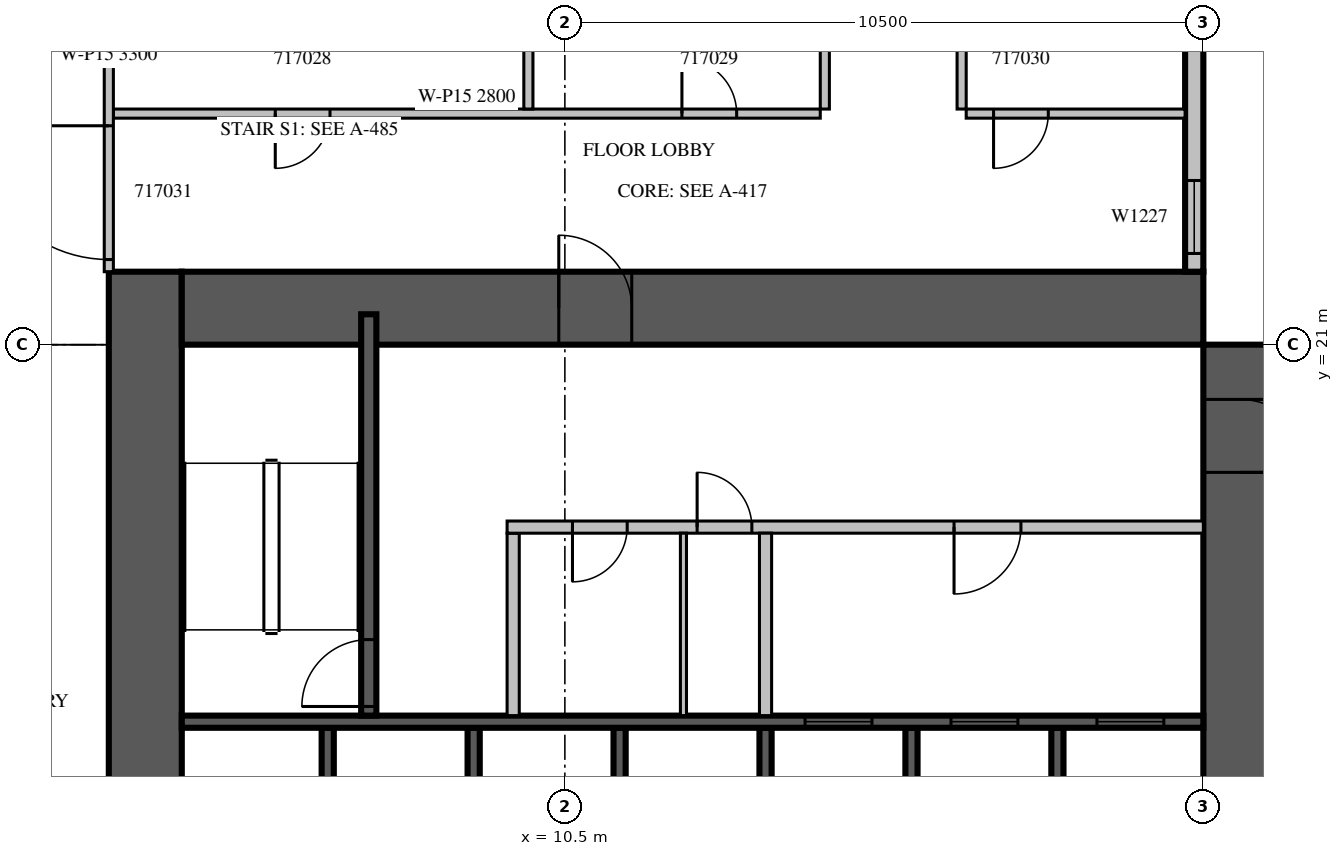
"""IFC4 building model, lengths in metres.
Left out: names, types, materials, properties, quantities, classifications, styles, units other than length and angle.
Written with IfcOpenShell. Run it as: python <this file> out.ifc"""

import sys

from ifc_helpers import new_model, si_unit, direction, frame, frame_2d, origin, place, context, subcontext, project, spatial, rectangle, extrude, source, transform, mapped, element, fill, save


model = new_model("IFC4")
c1 = context("Model", 3, precision=1e-05, world=origin(), true_north=direction((0.0, 1.0)))
c2 = subcontext(c1, "Body", "Model", "MODEL_VIEW")
j1 = project(units=[si_unit("LENGTHUNIT", "METRE"), si_unit("PLANEANGLEUNIT", "RADIAN")], contexts=[c1])
p1 = place(None, origin())
s1 = spatial("IfcSite", under=j1, at=p1, CompositionType="ELEMENT")
p2 = place(p1, origin())
s2 = spatial("IfcBuilding", under=s1, at=p2, CompositionType="ELEMENT")
p3 = place(p2, frame((0.0, 0.0, 82.5)))
s3 = spatial("IfcBuildingStorey", under=s2, at=p3, CompositionType="ELEMENT", Elevation=82.5)
m1 = source(origin(), c2, "Body", "SweptSolid", [
    extrude(rectangle(XDim=18.0, YDim=1.2, at=frame_2d((9.0, 0.0))), origin(), (0.0, 0.0, 1.0), 4.2),
])
p4 = place(p3, frame((3.6, 4.2, 0.0), z_axis=(0.0, 0.0, 1.0), x_axis=(0.0, 1.0, 0.0)))
e1 = element("IfcWall", 1, at=p4, inside=s3, PredefinedType="SHEAR", context=c2, shape_type="MappedRepresentation", body=[
    mapped(m1, transform((0.0, 0.0, 0.0), scale=1.0)),
])
m2 = source(origin(), c2, "Body", "SweptSolid", [
    extrude(rectangle(XDim=2.2, YDim=2.1, at=frame_2d((1.1, 1.05))), frame((0.0, 0.61, 0.0), z_axis=(0.0, -1.0, 0.0), x_axis=(1.0, 0.0, 0.0)), (0.0, 0.0, 1.0), 1.22),
])
p5 = place(p4, frame((4.2, 0.0, 0.0)))
e2 = element("IfcOpeningElement", 2, at=p5, cuts=e1, PredefinedType="OPENING", context=c2, shape_type="MappedRepresentation", body=[
    mapped(m2, transform((0.0, 0.0, 0.0), scale=1.0)),
])
m3 = source(origin(), c2, "Body", "SweptSolid", [
    extrude(rectangle(XDim=16.8, YDim=1.2, at=frame_2d((8.4, 0.0))), origin(), (0.0, 0.0, 1.0), 4.2),
])
p6 = place(p3, frame((21.6, 4.2, 0.0), z_axis=(0.0, 0.0, 1.0), x_axis=(0.0, 1.0, 0.0)))
e3 = element("IfcWall", 3, at=p6, inside=s3, PredefinedType="SHEAR", context=c2, shape_type="MappedRepresentation", body=[
    mapped(m3, transform((0.0, 0.0, 0.0), scale=1.0)),
])
p7 = place(p6, frame((4.2, 0.0, 0.0)))
e4 = element("IfcOpeningElement", 4, at=p7, cuts=e3, PredefinedType="OPENING", context=c2, shape_type="MappedRepresentation", body=[
    mapped(m2, transform((0.0, 0.0, 0.0), scale=1.0)),
])
m4 = source(origin(), c2, "Body", "SweptSolid", [
    extrude(rectangle(XDim=1.2, YDim=2.1, at=frame_2d((0.6, 1.05))), frame((0.0, 0.61, 0.0), z_axis=(0.0, -1.0, 0.0), x_axis=(1.0, 0.0, 0.0)), (0.0, 0.0, 1.0), 1.22),
])
p8 = place(p6, frame((14.7, 0.0, 0.0)))
e5 = element("IfcOpeningElement", 5, at=p8, cuts=e3, PredefinedType="OPENING", context=c2, shape_type="MappedRepresentation", body=[
    mapped(m4, transform((0.0, 0.0, 0.0), scale=1.0)),
])
p9 = place(p3, frame((4.2, 21.6, 0.0), z_axis=(0.0, 0.0, 1.0), x_axis=(1.0, 0.0, 0.0)))
e6 = element("IfcWall", 6, at=p9, inside=s3, PredefinedType="SHEAR", context=c2, shape_type="MappedRepresentation", body=[
    mapped(m3, transform((0.0, 0.0, 0.0), scale=1.0)),
])
p10 = place(p9, frame((6.2, 0.0, 0.0)))
e7 = element("IfcOpeningElement", 7, at=p10, cuts=e6, PredefinedType="OPENING", context=c2, shape_type="MappedRepresentation", body=[
    mapped(m4, transform((0.0, 0.0, 0.0), scale=1.0)),
])
m5 = source(origin(), c2, "Body", "SweptSolid", [
    extrude(rectangle(XDim=6.6, YDim=0.3, at=frame_2d((3.3, 0.0))), origin(), (0.0, 0.0, 1.0), 3.8),
])
p11 = place(p3, frame((20.85, 22.2, 0.0), z_axis=(0.0, 0.0, 1.0), x_axis=(0.0, 1.0, 0.0)))
e8 = element("IfcWall", 8, at=p11, inside=s3, PredefinedType="STANDARD", context=c2, shape_type="MappedRepresentation", body=[
    mapped(m5, transform((0.0, 0.0, 0.0), scale=1.0)),
])
m6 = source(origin(), c2, "Body", "SweptSolid", [
    extrude(rectangle(XDim=1.2, YDim=2.7, at=frame_2d((0.6, 1.35))), frame((0.0, 0.16, 0.0), z_axis=(0.0, -1.0, 0.0), x_axis=(1.0, 0.0, 0.0)), (0.0, 0.0, 1.0), 0.32),
])
p12 = place(p11, frame((0.3, 0.0, 0.6)))
e9 = element("IfcOpeningElement", 9, at=p12, cuts=e8, PredefinedType="OPENING", context=c2, shape_type="MappedRepresentation", body=[
    mapped(m6, transform((0.0, 0.0, 0.0), scale=1.0)),
])
m7 = source(origin(), c2, "Body", "SweptSolid", [
    extrude(rectangle(XDim=2.4, YDim=2.7, at=frame_2d((1.2, 1.35))), frame((0.0, 0.16, 0.0), z_axis=(0.0, -1.0, 0.0), x_axis=(1.0, 0.0, 0.0)), (0.0, 0.0, 1.0), 0.32),
])
p13 = place(p11, frame((3.9, 0.0, 0.6)))
e10 = element("IfcOpeningElement", 10, at=p13, cuts=e8, PredefinedType="OPENING", context=c2, shape_type="MappedRepresentation", body=[
    mapped(m7, transform((0.0, 0.0, 0.0), scale=1.0)),
])
m8 = source(origin(), c2, "Body", "SweptSolid", [
    extrude(rectangle(XDim=3.0, YDim=0.2, at=frame_2d((1.5, 0.0))), origin(), (0.0, 0.0, 1.0), 4.2),
])
for number, where, z_axis, x_axis in (
    (11, (6.6, 11.7, 0.0), (0.0, 0.0, 1.0), (0.0, 1.0, 0.0)),
    (12, (9.0, 11.7, 0.0), (0.0, 0.0, 1.0), (0.0, 1.0, 0.0)),
    (13, (11.4, 11.7, 0.0), (0.0, 0.0, 1.0), (0.0, 1.0, 0.0)),
    (14, (13.8, 11.7, 0.0), (0.0, 0.0, 1.0), (0.0, 1.0, 0.0)),
    (15, (16.2, 11.7, 0.0), (0.0, 0.0, 1.0), (0.0, 1.0, 0.0)),
    (16, (18.6, 11.7, 0.0), (0.0, 0.0, 1.0), (0.0, 1.0, 0.0)),
):
    element("IfcWall", number, at=place(p3, frame(where, z_axis=z_axis, x_axis=x_axis)), inside=s3, PredefinedType="SOLIDWALL", context=c2, shape_type="MappedRepresentation", body=[
        mapped(m8, transform((0.0, 0.0, 0.0), scale=1.0)),
    ])
m9 = source(origin(), c2, "Body", "SweptSolid", [
    extrude(rectangle(XDim=16.8, YDim=0.2, at=frame_2d((8.4, 0.0))), origin(), (0.0, 0.0, 1.0), 4.2),
])
p14 = place(p3, frame((4.2, 14.8, 0.0), z_axis=(0.0, 0.0, 1.0), x_axis=(1.0, 0.0, 0.0)))
e17 = element("IfcWall", 17, at=p14, inside=s3, PredefinedType="SOLIDWALL", context=c2, shape_type="MappedRepresentation", body=[
    mapped(m9, transform((0.0, 0.0, 0.0), scale=1.0)),
])
m10 = source(origin(), c2, "Body", "SweptSolid", [
    extrude(rectangle(XDim=1.1, YDim=2.1, at=frame_2d((0.55, 1.05))), frame((0.0, 0.11, 0.0), z_axis=(0.0, -1.0, 0.0), x_axis=(1.0, 0.0, 0.0)), (0.0, 0.0, 1.0), 0.22),
])
p15 = place(p14, frame((10.25, 0.0, 0.0)))
e18 = element("IfcOpeningElement", 18, at=p15, cuts=e17, PredefinedType="OPENING", context=c2, shape_type="MappedRepresentation", body=[
    mapped(m10, transform((0.0, 0.0, 0.0), scale=1.0)),
])
p16 = place(p14, frame((12.65, 0.0, 0.0)))
e19 = element("IfcOpeningElement", 19, at=p16, cuts=e17, PredefinedType="OPENING", context=c2, shape_type="MappedRepresentation", body=[
    mapped(m10, transform((0.0, 0.0, 0.0), scale=1.0)),
])
p17 = place(p14, frame((15.05, 0.0, 0.0)))
e20 = element("IfcOpeningElement", 20, at=p17, cuts=e17, PredefinedType="OPENING", context=c2, shape_type="MappedRepresentation", body=[
    mapped(m10, transform((0.0, 0.0, 0.0), scale=1.0)),
])
m11 = source(origin(), c2, "Body", "SweptSolid", [
    extrude(rectangle(XDim=6.6, YDim=0.25, at=frame_2d((3.3, 0.0))), origin(), (0.0, 0.0, 1.0), 3.8),
])
p18 = place(p3, frame((7.275, 14.9, 0.0), z_axis=(0.0, 0.0, 1.0), x_axis=(0.0, 1.0, 0.0)))
e21 = element("IfcWall", 21, at=p18, inside=s3, PredefinedType="SOLIDWALL", context=c2, shape_type="MappedRepresentation", body=[
    mapped(m11, transform((0.0, 0.0, 0.0), scale=1.0)),
])
m12 = source(origin(), c2, "Body", "SweptSolid", [
    extrude(rectangle(XDim=1.1, YDim=2.1, at=frame_2d((0.55, 1.05))), frame((0.0, 0.135, 0.0), z_axis=(0.0, -1.0, 0.0), x_axis=(1.0, 0.0, 0.0)), (0.0, 0.0, 1.0), 0.27),
])
p19 = place(p18, frame((0.15, 0.0, 0.0)))
e22 = element("IfcOpeningElement", 22, at=p19, cuts=e21, PredefinedType="OPENING", context=c2, shape_type="MappedRepresentation", body=[
    mapped(m12, transform((0.0, 0.0, 0.0), scale=1.0)),
])
m13 = source(origin(), c2, "Body", "SweptSolid", [
    extrude(rectangle(XDim=3.0, YDim=0.2, at=frame_2d((1.5, 0.0))), origin(), (0.0, 0.0, 1.0), 3.8),
])
p20 = place(p3, frame((9.65, 14.9, 0.0), z_axis=(0.0, 0.0, 1.0), x_axis=(0.0, 1.0, 0.0)))
e23 = element("IfcWall", 23, at=p20, inside=s3, PredefinedType="PARTITIONING", context=c2, shape_type="MappedRepresentation", body=[
    mapped(m13, transform((0.0, 0.0, 0.0), scale=1.0)),
])
m14 = source(origin(), c2, "Body", "SweptSolid", [
    extrude(rectangle(XDim=11.45, YDim=0.2, at=frame_2d((5.725, 0.0))), origin(), (0.0, 0.0, 1.0), 3.8),
])
p21 = place(p3, frame((9.55, 18.0, 0.0), z_axis=(0.0, 0.0, 1.0), x_axis=(1.0, 0.0, 0.0)))
e24 = element("IfcWall", 24, at=p21, inside=s3, PredefinedType="PARTITIONING", context=c2, shape_type="MappedRepresentation", body=[
    mapped(m14, transform((0.0, 0.0, 0.0), scale=1.0)),
])
m15 = source(origin(), c2, "Body", "SweptSolid", [
    extrude(rectangle(XDim=0.9, YDim=2.1, at=frame_2d((0.45, 1.05))), frame((0.0, 0.11, 0.0), z_axis=(0.0, -1.0, 0.0), x_axis=(1.0, 0.0, 0.0)), (0.0, 0.0, 1.0), 0.22),
])
p22 = place(p21, frame((1.075, 0.0, 0.0)))
e25 = element("IfcOpeningElement", 25, at=p22, cuts=e24, PredefinedType="OPENING", context=c2, shape_type="MappedRepresentation", body=[
    mapped(m15, transform((0.0, 0.0, 0.0), scale=1.0)),
])
p23 = place(p21, frame((3.125, 0.0, 0.0)))
e26 = element("IfcOpeningElement", 26, at=p23, cuts=e24, PredefinedType="OPENING", context=c2, shape_type="MappedRepresentation", body=[
    mapped(m15, transform((0.0, 0.0, 0.0), scale=1.0)),
])
p24 = place(p21, frame((7.35, 0.0, 0.0)))
e27 = element("IfcOpeningElement", 27, at=p24, cuts=e24, PredefinedType="OPENING", context=c2, shape_type="MappedRepresentation", body=[
    mapped(m10, transform((0.0, 0.0, 0.0), scale=1.0)),
])
p25 = place(p3, frame((13.8, 14.9, 0.0), z_axis=(0.0, 0.0, 1.0), x_axis=(0.0, 1.0, 0.0)))
e28 = element("IfcWall", 28, at=p25, inside=s3, PredefinedType="PARTITIONING", context=c2, shape_type="MappedRepresentation", body=[
    mapped(m13, transform((0.0, 0.0, 0.0), scale=1.0)),
])
m16 = source(origin(), c2, "Body", "SweptSolid", [
    extrude(rectangle(XDim=3.0, YDim=0.1, at=frame_2d((1.5, 0.0))), origin(), (0.0, 0.0, 1.0), 3.8),
])
p26 = place(p3, frame((12.45, 14.9, 0.0), z_axis=(0.0, 0.0, 1.0), x_axis=(0.0, 1.0, 0.0)))
e29 = element("IfcWall", 29, at=p26, inside=s3, PredefinedType="PARTITIONING", context=c2, shape_type="MappedRepresentation", body=[
    mapped(m16, transform((0.0, 0.0, 0.0), scale=1.0)),
])
m17 = source(origin(), c2, "Body", "SweptSolid", [
    extrude(rectangle(XDim=11.625, YDim=0.15, at=frame_2d((5.812, 0.0))), origin(), (0.0, 0.0, 1.0), 2.8),
])
p27 = place(p3, frame((3.075, 24.8, 0.0), z_axis=(0.0, 0.0, 1.0), x_axis=(1.0, 0.0, 0.0)))
e30 = element("IfcWall", 30, at=p27, inside=s3, PredefinedType="PARTITIONING", context=c2, shape_type="MappedRepresentation", body=[
    mapped(m17, transform((0.0, 0.0, 0.0), scale=1.0)),
])
m18 = source(origin(), c2, "Body", "SweptSolid", [
    extrude(rectangle(XDim=0.9, YDim=2.1, at=frame_2d((0.45, 1.05))), frame((0.0, 0.085, 0.0), z_axis=(0.0, -1.0, 0.0), x_axis=(1.0, 0.0, 0.0)), (0.0, 0.0, 1.0), 0.17),
])
p28 = place(p27, frame((2.663, 0.0, 0.0)))
e31 = element("IfcOpeningElement", 31, at=p28, cuts=e30, PredefinedType="OPENING", context=c2, shape_type="MappedRepresentation", body=[
    mapped(m18, transform((0.0, 0.0, 0.0), scale=1.0)),
])
p29 = place(p27, frame((9.35, 0.0, 0.0)))
e32 = element("IfcOpeningElement", 32, at=p29, cuts=e30, PredefinedType="OPENING", context=c2, shape_type="MappedRepresentation", body=[
    mapped(m18, transform((0.0, 0.0, 0.0), scale=1.0)),
])
m19 = source(origin(), c2, "Body", "SweptSolid", [
    extrude(rectangle(XDim=3.6, YDim=0.15, at=frame_2d((1.8, 0.0))), origin(), (0.0, 0.0, 1.0), 3.8),
])
p30 = place(p3, frame((17.1, 24.8, 0.0), z_axis=(0.0, 0.0, 1.0), x_axis=(1.0, 0.0, 0.0)))
e33 = element("IfcWall", 33, at=p30, inside=s3, PredefinedType="PARTITIONING", context=c2, shape_type="MappedRepresentation", body=[
    mapped(m19, transform((0.0, 0.0, 0.0), scale=1.0)),
])
p31 = place(p30, frame((0.45, 0.0, 0.0)))
e34 = element("IfcOpeningElement", 34, at=p31, cuts=e33, PredefinedType="OPENING", context=c2, shape_type="MappedRepresentation", body=[
    mapped(m18, transform((0.0, 0.0, 0.0), scale=1.0)),
])
m20 = source(origin(), c2, "Body", "SweptSolid", [
    extrude(rectangle(XDim=4.45, YDim=0.15, at=frame_2d((2.225, 0.0))), origin(), (0.0, 0.0, 1.0), 3.3),
])
p32 = place(p3, frame((9.9, 24.875, 0.0), z_axis=(0.0, 0.0, 1.0), x_axis=(0.0, 1.0, 0.0)))
e35 = element("IfcWall", 35, at=p32, inside=s3, PredefinedType="PARTITIONING", context=c2, shape_type="MappedRepresentation", body=[
    mapped(m20, transform((0.0, 0.0, 0.0), scale=1.0)),
])
m21 = source(origin(), c2, "Body", "SweptSolid", [
    extrude(rectangle(XDim=4.45, YDim=0.15, at=frame_2d((2.225, 0.0))), origin(), (0.0, 0.0, 1.0), 3.8),
])
for number, where, z_axis, x_axis in (
    (36, (14.775, 24.875, 0.0), (0.0, 0.0, 1.0), (0.0, 1.0, 0.0)),
    (37, (17.025, 29.325, 0.0), (0.0, 0.0, 1.0), (0.0, -1.0, 0.0)),
):
    element("IfcWall", number, at=place(p3, frame(where, z_axis=z_axis, x_axis=x_axis)), inside=s3, PredefinedType="PARTITIONING", context=c2, shape_type="MappedRepresentation", body=[
        mapped(m21, transform((0.0, 0.0, 0.0), scale=1.0)),
    ])
m22 = source(origin(), c2, "Body", "SweptSolid", [
    extrude(rectangle(XDim=7.125, YDim=0.15, at=frame_2d((3.562, 0.0))), origin(), (0.0, 0.0, 1.0), 3.3),
])
p33 = place(p3, frame((3.0, 29.325, 0.0), z_axis=(0.0, 0.0, 1.0), x_axis=(0.0, -1.0, 0.0)))
e38 = element("IfcWall", 38, at=p33, inside=s3, PredefinedType="PARTITIONING", context=c2, shape_type="MappedRepresentation", body=[
    mapped(m22, transform((0.0, 0.0, 0.0), scale=1.0)),
])
m23 = source(origin(), c2, "Body", "SweptSolid", [
    extrude(rectangle(XDim=2.2, YDim=2.1, at=frame_2d((1.1, 1.05))), frame((0.0, 0.085, 0.0), z_axis=(0.0, -1.0, 0.0), x_axis=(1.0, 0.0, 0.0)), (0.0, 0.0, 1.0), 0.17),
])
p34 = place(p33, frame((4.725, 0.0, 0.0)))
e39 = element("IfcOpeningElement", 39, at=p34, cuts=e38, PredefinedType="OPENING", context=c2, shape_type="MappedRepresentation", body=[
    mapped(m23, transform((0.0, 0.0, 0.0), scale=1.0)),
])
m24 = source(origin(), c2, "Body", "SweptSolid", [
    extrude(rectangle(XDim=1.2, YDim=2.7, at=frame_2d((0.6, 1.35))), frame((0.0, 0.03, 0.0), z_axis=(0.0, -1.0, 0.0), x_axis=(1.0, 0.0, 0.0)), (0.0, 0.0, 1.0), 0.06),
])
p35 = place(p12, origin())
e40 = element("IfcWindow", 40, at=p35, inside=s3, PartitioningType="SINGLE_PANEL", PredefinedType="WINDOW", context=c2, shape_type="MappedRepresentation", body=[
    mapped(m24, transform((0.0, 0.0, 0.0), scale=1.0)),
])
fill(e9, e40)
m25 = source(origin(), c2, "Body", "SweptSolid", [
    extrude(rectangle(XDim=1.1, YDim=2.1, at=frame_2d((0.55, 1.05))), frame((0.0, 0.025, 0.0), z_axis=(0.0, -1.0, 0.0), x_axis=(1.0, 0.0, 0.0)), (0.0, 0.0, 1.0), 0.05),
])
p36 = place(p15, origin())
e41 = element("IfcDoor", 41, at=p36, inside=s3, OperationType="SLIDING_TO_LEFT", PredefinedType="DOOR", context=c2, shape_type="MappedRepresentation", body=[
    mapped(m25, transform((0.0, 0.0, 0.0), scale=1.0)),
])
fill(e18, e41)
p37 = place(p16, origin())
e42 = element("IfcDoor", 42, at=p37, inside=s3, OperationType="SLIDING_TO_LEFT", PredefinedType="DOOR", context=c2, shape_type="MappedRepresentation", body=[
    mapped(m25, transform((0.0, 0.0, 0.0), scale=1.0)),
])
fill(e19, e42)
p38 = place(p17, origin())
e43 = element("IfcDoor", 43, at=p38, inside=s3, OperationType="SLIDING_TO_LEFT", PredefinedType="DOOR", context=c2, shape_type="MappedRepresentation", body=[
    mapped(m25, transform((0.0, 0.0, 0.0), scale=1.0)),
])
fill(e20, e43)
p39 = place(p19, origin())
e44 = element("IfcDoor", 44, at=p39, inside=s3, OperationType="SINGLE_SWING_LEFT", PredefinedType="DOOR", context=c2, shape_type="MappedRepresentation", body=[
    mapped(m25, transform((0.0, 0.0, 0.0), scale=1.0)),
])
fill(e22, e44)
m26 = source(origin(), c2, "Body", "SweptSolid", [
    extrude(rectangle(XDim=0.9, YDim=2.1, at=frame_2d((0.45, 1.05))), frame((0.0, 0.025, 0.0), z_axis=(0.0, -1.0, 0.0), x_axis=(1.0, 0.0, 0.0)), (0.0, 0.0, 1.0), 0.05),
])
p40 = place(p22, origin())
e45 = element("IfcDoor", 45, at=p40, inside=s3, OperationType="SINGLE_SWING_RIGHT", PredefinedType="DOOR", context=c2, shape_type="MappedRepresentation", body=[
    mapped(m26, transform((0.0, 0.0, 0.0), scale=1.0)),
])
fill(e25, e45)
p41 = place(p23, origin())
e46 = element("IfcDoor", 46, at=p41, inside=s3, OperationType="SINGLE_SWING_LEFT", PredefinedType="DOOR", context=c2, shape_type="MappedRepresentation", body=[
    mapped(m26, transform((0.0, 0.0, 0.0), scale=1.0)),
])
fill(e26, e46)
p42 = place(p24, origin())
e47 = element("IfcDoor", 47, at=p42, inside=s3, OperationType="SINGLE_SWING_RIGHT", PredefinedType="DOOR", context=c2, shape_type="MappedRepresentation", body=[
    mapped(m25, transform((0.0, 0.0, 0.0), scale=1.0)),
])
fill(e27, e47)
m27 = source(origin(), c2, "Body", "SweptSolid", [
    extrude(rectangle(XDim=1.2, YDim=2.1, at=frame_2d((0.6, 1.05))), frame((0.0, 0.025, 0.0), z_axis=(0.0, -1.0, 0.0), x_axis=(1.0, 0.0, 0.0)), (0.0, 0.0, 1.0), 0.05),
])
p43 = place(p10, origin())
e48 = element("IfcDoor", 48, at=p43, inside=s3, OperationType="SINGLE_SWING_LEFT", PredefinedType="DOOR", context=c2, shape_type="MappedRepresentation", body=[
    mapped(m27, transform((0.0, 0.0, 0.0), scale=1.0)),
])
fill(e7, e48)
p44 = place(p8, origin())
e49 = element("IfcDoor", 49, at=p44, inside=s3, OperationType="SINGLE_SWING_RIGHT", PredefinedType="DOOR", context=c2, shape_type="MappedRepresentation", body=[
    mapped(m27, transform((0.0, 0.0, 0.0), scale=1.0)),
])
fill(e5, e49)
p45 = place(p28, origin())
e50 = element("IfcDoor", 50, at=p45, inside=s3, OperationType="SINGLE_SWING_RIGHT", PredefinedType="DOOR", context=c2, shape_type="MappedRepresentation", body=[
    mapped(m26, transform((0.0, 0.0, 0.0), scale=1.0)),
])
fill(e31, e50)
p46 = place(p29, origin())
e51 = element("IfcDoor", 51, at=p46, inside=s3, OperationType="SINGLE_SWING_LEFT", PredefinedType="DOOR", context=c2, shape_type="MappedRepresentation", body=[
    mapped(m26, transform((0.0, 0.0, 0.0), scale=1.0)),
])
fill(e32, e51)
p47 = place(p31, origin())
e52 = element("IfcDoor", 52, at=p47, inside=s3, OperationType="SINGLE_SWING_RIGHT", PredefinedType="DOOR", context=c2, shape_type="MappedRepresentation", body=[
    mapped(m26, transform((0.0, 0.0, 0.0), scale=1.0)),
])
fill(e34, e52)
m28 = source(origin(), c2, "Body", "SweptSolid", [
    extrude(rectangle(XDim=2.2, YDim=2.1, at=frame_2d((1.1, 1.05))), frame((0.0, 0.025, 0.0), z_axis=(0.0, -1.0, 0.0), x_axis=(1.0, 0.0, 0.0)), (0.0, 0.0, 1.0), 0.05),
])
p48 = place(p34, origin())
e53 = element("IfcDoor", 53, at=p48, inside=s3, OperationType="DOUBLE_DOOR_SINGLE_SWING", PredefinedType="DOOR", context=c2, shape_type="MappedRepresentation", body=[
    mapped(m28, transform((0.0, 0.0, 0.0), scale=1.0)),
])
fill(e39, e53)
save(model, sys.argv[1])
